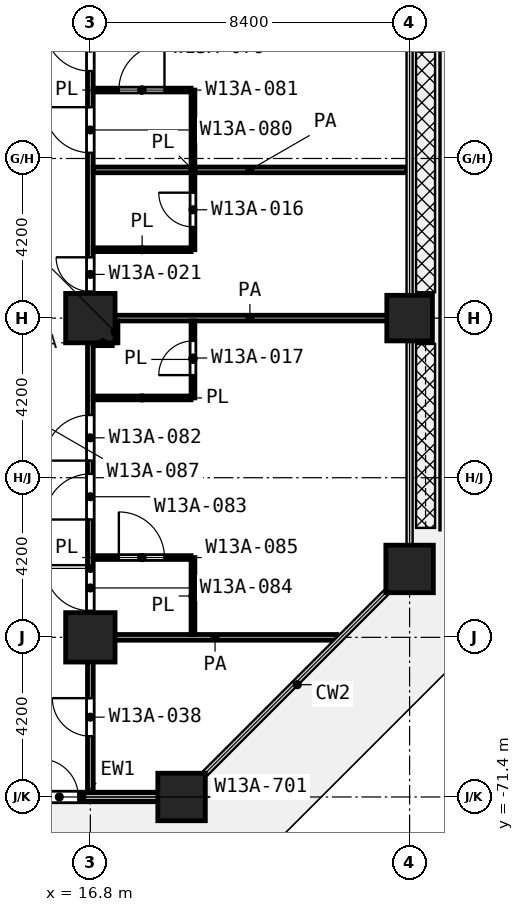
"""IFC4 building model, lengths in metres.
Left out: names, types, materials, properties, quantities, classifications, styles, units other than length and angle.
Written with IfcOpenShell. Run it as: python <this file> out.ifc"""

import sys

from ifc_helpers import new_model, si_unit, direction, frame, frame_2d, origin, origin_2d, place, context, subcontext, project, spatial, rectangle, extrude, element, fill, save


model = new_model("IFC4")
c1 = context("Model", 3, precision=1e-05, world=origin(), true_north=direction((0.0, 1.0)))
c2 = subcontext(c1, "Body", "Model", "MODEL_VIEW")
j1 = project(units=[si_unit("LENGTHUNIT", "METRE"), si_unit("PLANEANGLEUNIT", "RADIAN")], contexts=[c1])
p1 = place(None, origin())
s1 = spatial("IfcSite", under=j1, at=p1, CompositionType="ELEMENT")
p2 = place(p1, origin())
s2 = spatial("IfcBuilding", under=s1, at=p2, CompositionType="ELEMENT")
p3 = place(p2, frame((0.0, 0.0, 60.2)))
s3 = spatial("IfcBuildingStorey", under=s2, at=p3, CompositionType="ELEMENT", Elevation=60.2)
p4 = place(p3, frame((16.8, -58.8, 0.0), z_axis=(0.0, 0.0, 1.0), x_axis=(1.0, 0.0, 0.0)))
e1 = element("IfcColumn", 1, at=p4, inside=s3, PredefinedType="COLUMN", context=c2, shape_type="SweptSolid", body=[
    extrude(rectangle(XDim=1.3, YDim=1.3, at=origin_2d()), origin(), (0.0, 0.0, 1.0), 4.2),
])
p5 = place(p3, frame((25.2, -58.8, 0.0), z_axis=(0.0, 0.0, 1.0), x_axis=(1.0, 0.0, 0.0)))
e2 = element("IfcColumn", 2, at=p5, inside=s3, PredefinedType="COLUMN", context=c2, shape_type="SweptSolid", body=[
    extrude(rectangle(XDim=1.2, YDim=1.2, at=origin_2d()), origin(), (0.0, 0.0, 1.0), 4.2),
])
p6 = place(p3, frame((25.2, -65.4, 0.0), z_axis=(0.0, 0.0, 1.0), x_axis=(1.0, 0.0, 0.0)))
e3 = element("IfcColumn", 3, at=p6, inside=s3, PredefinedType="COLUMN", context=c2, shape_type="SweptSolid", body=[
    extrude(rectangle(XDim=1.25, YDim=1.25, at=origin_2d()), origin(), (0.0, 0.0, 1.0), 4.2),
])
p7 = place(p3, frame((16.8, -67.2, 0.0), z_axis=(0.0, 0.0, 1.0), x_axis=(1.0, 0.0, 0.0)))
e4 = element("IfcColumn", 4, at=p7, inside=s3, PredefinedType="COLUMN", context=c2, shape_type="SweptSolid", body=[
    extrude(rectangle(XDim=1.3, YDim=1.3, at=origin_2d()), origin(), (0.0, 0.0, 1.0), 4.2),
])
p8 = place(p3, frame((19.2, -71.4, 0.0), z_axis=(0.0, 0.0, 1.0), x_axis=(1.0, 0.0, 0.0)))
e5 = element("IfcColumn", 5, at=p8, inside=s3, PredefinedType="COLUMN", context=c2, shape_type="SweptSolid", body=[
    extrude(rectangle(XDim=1.25, YDim=1.25, at=origin_2d()), origin(), (0.0, 0.0, 1.0), 4.2),
])
p9 = place(p3, frame((14.592, -71.4, 0.0), z_axis=(0.0, 0.0, 1.0), x_axis=(1.0, 0.0, 0.0)))
e6 = element("IfcWall", 6, at=p9, inside=s3, PredefinedType="SOLIDWALL", context=c2, shape_type="SweptSolid", body=[
    extrude(rectangle(XDim=3.983, YDim=0.25, at=frame_2d((1.992, 0.0))), origin(), (0.0, 0.0, 1.0), 3.78),
])
p10 = place(p9, frame((0.892, 0.0, 0.0)))
e7 = element("IfcOpeningElement", 7, at=p10, cuts=e6, PredefinedType="OPENING", context=c2, shape_type="SweptSolid", body=[
    extrude(rectangle(XDim=1.0, YDim=2.1, at=frame_2d((0.5, 1.05))), frame((0.0, 0.135, 0.0), z_axis=(0.0, -1.0, 0.0), x_axis=(1.0, 0.0, 0.0)), (0.0, 0.0, 1.0), 0.27),
])
p11 = place(p3, frame((16.875, -65.1, 0.0), z_axis=(0.0, 0.0, 1.0), x_axis=(1.0, 0.0, 0.0)))
e8 = element("IfcWall", 8, at=p11, inside=s3, PredefinedType="PARTITIONING", context=c2, shape_type="SweptSolid", body=[
    extrude(rectangle(XDim=2.575, YDim=0.1, at=frame_2d((1.288, 0.0))), origin(), (0.0, 0.0, 1.0), 3.9),
])
p12 = place(p11, frame((0.675, 0.0, 0.0)))
e9 = element("IfcOpeningElement", 9, at=p12, cuts=e8, PredefinedType="OPENING", context=c2, shape_type="SweptSolid", body=[
    extrude(rectangle(XDim=1.2, YDim=2.1, at=frame_2d((0.6, 1.05))), frame((0.0, 0.06, 0.0), z_axis=(0.0, -1.0, 0.0), x_axis=(1.0, 0.0, 0.0)), (0.0, 0.0, 1.0), 0.12),
])
for number, where, z_axis, x_axis in (
    (10, (16.875, -60.9, 0.0), (0.0, 0.0, 1.0), (1.0, 0.0, 0.0)),
    (11, (16.875, -57.0, 0.0), (0.0, 0.0, 1.0), (1.0, 0.0, 0.0)),
):
    element("IfcWall", number, at=place(p3, frame(where, z_axis=z_axis, x_axis=x_axis)), inside=s3, PredefinedType="PARTITIONING", context=c2, shape_type="SweptSolid", body=[
        extrude(rectangle(XDim=2.575, YDim=0.1, at=frame_2d((1.288, 0.0))), origin(), (0.0, 0.0, 1.0), 3.9),
    ])
p13 = place(p3, frame((16.875, -52.8, 0.0), z_axis=(0.0, 0.0, 1.0), x_axis=(1.0, 0.0, 0.0)))
e12 = element("IfcWall", 12, at=p13, inside=s3, PredefinedType="PARTITIONING", context=c2, shape_type="SweptSolid", body=[
    extrude(rectangle(XDim=2.575, YDim=0.1, at=frame_2d((1.288, 0.0))), origin(), (0.0, 0.0, 1.0), 3.9),
])
p14 = place(p13, frame((0.675, 0.0, 0.0)))
e13 = element("IfcOpeningElement", 13, at=p14, cuts=e12, PredefinedType="OPENING", context=c2, shape_type="SweptSolid", body=[
    extrude(rectangle(XDim=1.2, YDim=2.1, at=frame_2d((0.6, 1.05))), frame((0.0, 0.06, 0.0), z_axis=(0.0, -1.0, 0.0), x_axis=(1.0, 0.0, 0.0)), (0.0, 0.0, 1.0), 0.12),
])
p15 = place(p3, frame((19.5, -67.125, 0.0), z_axis=(0.0, 0.0, 1.0), x_axis=(0.0, 1.0, 0.0)))
e14 = element("IfcWall", 14, at=p15, inside=s3, PredefinedType="PARTITIONING", context=c2, shape_type="SweptSolid", body=[
    extrude(rectangle(XDim=2.025, YDim=0.1, at=frame_2d((1.012, 0.0))), origin(), (0.0, 0.0, 1.0), 3.9),
])
p16 = place(p3, frame((19.5, -60.9, 0.0), z_axis=(0.0, 0.0, 1.0), x_axis=(0.0, 1.0, 0.0)))
e15 = element("IfcWall", 15, at=p16, inside=s3, PredefinedType="PARTITIONING", context=c2, shape_type="SweptSolid", body=[
    extrude(rectangle(XDim=2.025, YDim=0.1, at=frame_2d((1.012, 0.0))), origin(), (0.0, 0.0, 1.0), 3.9),
])
p17 = place(p16, frame((0.6, 0.0, 0.0)))
e16 = element("IfcOpeningElement", 16, at=p17, cuts=e15, PredefinedType="OPENING", context=c2, shape_type="SweptSolid", body=[
    extrude(rectangle(XDim=0.9, YDim=2.1, at=frame_2d((0.45, 1.05))), frame((0.0, 0.06, 0.0), z_axis=(0.0, -1.0, 0.0), x_axis=(1.0, 0.0, 0.0)), (0.0, 0.0, 1.0), 0.12),
])
p18 = place(p3, frame((19.5, -57.0, 0.0), z_axis=(0.0, 0.0, 1.0), x_axis=(0.0, 1.0, 0.0)))
e17 = element("IfcWall", 17, at=p18, inside=s3, PredefinedType="PARTITIONING", context=c2, shape_type="SweptSolid", body=[
    extrude(rectangle(XDim=4.2, YDim=0.1, at=frame_2d((2.1, 0.0))), origin(), (0.0, 0.0, 1.0), 3.9),
])
p19 = place(p18, frame((0.6, 0.0, 0.0)))
e18 = element("IfcOpeningElement", 18, at=p19, cuts=e17, PredefinedType="OPENING", context=c2, shape_type="SweptSolid", body=[
    extrude(rectangle(XDim=0.9, YDim=2.1, at=frame_2d((0.45, 1.05))), frame((0.0, 0.06, 0.0), z_axis=(0.0, -1.0, 0.0), x_axis=(1.0, 0.0, 0.0)), (0.0, 0.0, 1.0), 0.12),
])
p20 = place(p3, frame((16.875, -67.2, 0.0), z_axis=(0.0, 0.0, 1.0), x_axis=(1.0, 0.0, 0.0)))
e19 = element("IfcWall", 19, at=p20, inside=s3, PredefinedType="PARTITIONING", context=c2, shape_type="SweptSolid", body=[
    extrude(rectangle(XDim=6.412, YDim=0.15, at=frame_2d((3.206, 0.0))), origin(), (0.0, 0.0, 1.0), 3.9),
])
p21 = place(p3, frame((16.877, -59.45, 0.0), z_axis=(0.0, 0.0, 1.0), x_axis=(1.0, 0.0, 0.0)))
e20 = element("IfcWall", 20, at=p21, inside=s3, PredefinedType="PARTITIONING", context=c2, shape_type="SweptSolid", body=[
    extrude(rectangle(XDim=0.498, YDim=0.15, at=frame_2d((0.249, 0.0))), origin(), (0.0, 0.0, 1.0), 3.9),
])
p22 = place(p3, frame((16.877, -58.8, 0.0), z_axis=(0.0, 0.0, 1.0), x_axis=(1.0, 0.0, 0.0)))
e21 = element("IfcWall", 21, at=p22, inside=s3, PredefinedType="PARTITIONING", context=c2, shape_type="SweptSolid", body=[
    extrude(rectangle(XDim=8.243, YDim=0.15, at=frame_2d((4.122, 0.0))), origin(), (0.0, 0.0, 1.0), 3.9),
])
p23 = place(p3, frame((16.875, -54.9, 0.0), z_axis=(0.0, 0.0, 1.0), x_axis=(1.0, 0.0, 0.0)))
e22 = element("IfcWall", 22, at=p23, inside=s3, PredefinedType="PARTITIONING", context=c2, shape_type="SweptSolid", body=[
    extrude(rectangle(XDim=8.245, YDim=0.15, at=frame_2d((4.123, 0.0))), origin(), (0.0, 0.0, 1.0), 3.9),
])
p24 = place(p3, frame((16.8, -71.32, 0.0), z_axis=(0.0, 0.0, 1.0), x_axis=(0.0, 1.0, 0.0)))
e23 = element("IfcWall", 23, at=p24, inside=s3, PredefinedType="PARTITIONING", context=c2, shape_type="SweptSolid", body=[
    extrude(rectangle(XDim=11.868, YDim=0.15, at=frame_2d((5.934, 0.0))), origin(), (0.0, 0.0, 1.0), 3.9),
])
p25 = place(p24, frame((8.77, 0.0, 0.0)))
e24 = element("IfcOpeningElement", 24, at=p25, cuts=e23, PredefinedType="OPENING", context=c2, shape_type="SweptSolid", body=[
    extrude(rectangle(XDim=1.2, YDim=2.1, at=frame_2d((0.6, 1.05))), frame((0.0, 0.085, 0.0), z_axis=(0.0, -1.0, 0.0), x_axis=(1.0, 0.0, 0.0)), (0.0, 0.0, 1.0), 0.17),
])
p26 = place(p24, frame((7.22, 0.0, 0.0)))
e25 = element("IfcOpeningElement", 25, at=p26, cuts=e23, PredefinedType="OPENING", context=c2, shape_type="SweptSolid", body=[
    extrude(rectangle(XDim=1.2, YDim=2.1, at=frame_2d((0.6, 1.05))), frame((0.0, 0.085, 0.0), z_axis=(0.0, -1.0, 0.0), x_axis=(1.0, 0.0, 0.0)), (0.0, 0.0, 1.0), 0.17),
])
p27 = place(p24, frame((4.82, 0.0, 0.0)))
e26 = element("IfcOpeningElement", 26, at=p27, cuts=e23, PredefinedType="OPENING", context=c2, shape_type="SweptSolid", body=[
    extrude(rectangle(XDim=1.2, YDim=2.1, at=frame_2d((0.6, 1.05))), frame((0.0, 0.085, 0.0), z_axis=(0.0, -1.0, 0.0), x_axis=(1.0, 0.0, 0.0)), (0.0, 0.0, 1.0), 0.17),
])
p28 = place(p24, frame((1.52, 0.0, 0.0)))
e27 = element("IfcOpeningElement", 27, at=p28, cuts=e23, PredefinedType="OPENING", context=c2, shape_type="SweptSolid", body=[
    extrude(rectangle(XDim=1.0, YDim=2.1, at=frame_2d((0.5, 1.05))), frame((0.0, 0.085, 0.0), z_axis=(0.0, -1.0, 0.0), x_axis=(1.0, 0.0, 0.0)), (0.0, 0.0, 1.0), 0.17),
])
p29 = place(p3, frame((16.8, -58.798, 0.0), z_axis=(0.0, 0.0, 1.0), x_axis=(0.0, 1.0, 0.0)))
e28 = element("IfcWall", 28, at=p29, inside=s3, PredefinedType="PARTITIONING", context=c2, shape_type="SweptSolid", body=[
    extrude(rectangle(XDim=33.698, YDim=0.15, at=frame_2d((16.849, 0.0))), origin(), (0.0, 0.0, 1.0), 3.9),
])
p30 = place(p29, frame((23.298, 0.0, 0.0)))
e29 = element("IfcOpeningElement", 29, at=p30, cuts=e28, PredefinedType="OPENING", context=c2, shape_type="SweptSolid", body=[
    extrude(rectangle(XDim=1.2, YDim=2.1, at=frame_2d((0.6, 1.05))), frame((0.0, 0.085, 0.0), z_axis=(0.0, -1.0, 0.0), x_axis=(1.0, 0.0, 0.0)), (0.0, 0.0, 1.0), 0.17),
])
p31 = place(p29, frame((15.223, 0.0, 0.0)))
e30 = element("IfcOpeningElement", 30, at=p31, cuts=e28, PredefinedType="OPENING", context=c2, shape_type="SweptSolid", body=[
    extrude(rectangle(XDim=0.9, YDim=2.1, at=frame_2d((0.45, 1.05))), frame((0.0, 0.085, 0.0), z_axis=(0.0, -1.0, 0.0), x_axis=(1.0, 0.0, 0.0)), (0.0, 0.0, 1.0), 0.17),
])
p32 = place(p29, frame((13.348, 0.0, 0.0)))
e31 = element("IfcOpeningElement", 31, at=p32, cuts=e28, PredefinedType="OPENING", context=c2, shape_type="SweptSolid", body=[
    extrude(rectangle(XDim=1.2, YDim=2.1, at=frame_2d((0.6, 1.05))), frame((0.0, 0.085, 0.0), z_axis=(0.0, -1.0, 0.0), x_axis=(1.0, 0.0, 0.0)), (0.0, 0.0, 1.0), 0.17),
])
p33 = place(p29, frame((9.098, 0.0, 0.0)))
e32 = element("IfcOpeningElement", 32, at=p33, cuts=e28, PredefinedType="OPENING", context=c2, shape_type="SweptSolid", body=[
    extrude(rectangle(XDim=1.2, YDim=2.1, at=frame_2d((0.6, 1.05))), frame((0.0, 0.085, 0.0), z_axis=(0.0, -1.0, 0.0), x_axis=(1.0, 0.0, 0.0)), (0.0, 0.0, 1.0), 0.17),
])
p34 = place(p29, frame((6.498, 0.0, 0.0)))
e33 = element("IfcOpeningElement", 33, at=p34, cuts=e28, PredefinedType="OPENING", context=c2, shape_type="SweptSolid", body=[
    extrude(rectangle(XDim=1.2, YDim=2.1, at=frame_2d((0.6, 1.05))), frame((0.0, 0.085, 0.0), z_axis=(0.0, -1.0, 0.0), x_axis=(1.0, 0.0, 0.0)), (0.0, 0.0, 1.0), 0.17),
])
p35 = place(p29, frame((4.348, 0.0, 0.0)))
e34 = element("IfcOpeningElement", 34, at=p35, cuts=e28, PredefinedType="OPENING", context=c2, shape_type="SweptSolid", body=[
    extrude(rectangle(XDim=1.2, YDim=2.1, at=frame_2d((0.6, 1.05))), frame((0.0, 0.085, 0.0), z_axis=(0.0, -1.0, 0.0), x_axis=(1.0, 0.0, 0.0)), (0.0, 0.0, 1.0), 0.17),
])
p36 = place(p29, frame((0.698, 0.0, 0.0)))
e35 = element("IfcOpeningElement", 35, at=p36, cuts=e28, PredefinedType="OPENING", context=c2, shape_type="SweptSolid", body=[
    extrude(rectangle(XDim=0.9, YDim=2.1, at=frame_2d((0.45, 1.05))), frame((0.0, 0.085, 0.0), z_axis=(0.0, -1.0, 0.0), x_axis=(1.0, 0.0, 0.0)), (0.0, 0.0, 1.0), 0.17),
])
p37 = place(p3, frame((17.45, -59.45, 0.0), z_axis=(0.0, 0.0, 1.0), x_axis=(0.0, 1.0, 0.0)))
e36 = element("IfcWall", 36, at=p37, inside=s3, PredefinedType="PARTITIONING", context=c2, shape_type="SweptSolid", body=[
    extrude(rectangle(XDim=0.575, YDim=0.15, at=frame_2d((0.288, 0.0))), origin(), (0.0, 0.0, 1.0), 3.9),
])
p38 = place(p10, origin())
e37 = element("IfcDoor", 37, at=p38, inside=s3, OperationType="SINGLE_SWING_LEFT", PredefinedType="DOOR", context=c2, shape_type="SweptSolid", body=[
    extrude(rectangle(XDim=1.0, YDim=2.1, at=frame_2d((0.5, 1.05))), frame((0.0, 0.025, 0.0), z_axis=(0.0, -1.0, 0.0), x_axis=(1.0, 0.0, 0.0)), (0.0, 0.0, 1.0), 0.05),
])
fill(e7, e37)
p39 = place(p34, origin())
e38 = element("IfcDoor", 38, at=p39, inside=s3, OperationType="SINGLE_SWING_RIGHT", PredefinedType="DOOR", context=c2, shape_type="SweptSolid", body=[
    extrude(rectangle(XDim=1.2, YDim=2.1, at=frame_2d((0.6, 1.05))), frame((0.0, 0.025, 0.0), z_axis=(0.0, -1.0, 0.0), x_axis=(1.0, 0.0, 0.0)), (0.0, 0.0, 1.0), 0.05),
])
fill(e33, e38)
p40 = place(p35, origin())
e39 = element("IfcDoor", 39, at=p40, inside=s3, OperationType="SINGLE_SWING_RIGHT", PredefinedType="DOOR", context=c2, shape_type="SweptSolid", body=[
    extrude(rectangle(XDim=1.2, YDim=2.1, at=frame_2d((0.6, 1.05))), frame((0.0, 0.025, 0.0), z_axis=(0.0, -1.0, 0.0), x_axis=(1.0, 0.0, 0.0)), (0.0, 0.0, 1.0), 0.05),
])
fill(e34, e39)
p41 = place(p14, origin())
e40 = element("IfcDoor", 40, at=p41, inside=s3, OperationType="SINGLE_SWING_RIGHT", PredefinedType="DOOR", context=c2, shape_type="SweptSolid", body=[
    extrude(rectangle(XDim=1.2, YDim=2.1, at=frame_2d((0.6, 1.05))), frame((0.0, 0.025, 0.0), z_axis=(0.0, -1.0, 0.0), x_axis=(1.0, 0.0, 0.0)), (0.0, 0.0, 1.0), 0.05),
])
fill(e13, e40)
p42 = place(p36, origin())
e41 = element("IfcDoor", 41, at=p42, inside=s3, OperationType="SINGLE_SWING_RIGHT", PredefinedType="DOOR", context=c2, shape_type="SweptSolid", body=[
    extrude(rectangle(XDim=0.9, YDim=2.1, at=frame_2d((0.45, 1.05))), frame((0.0, 0.025, 0.0), z_axis=(0.0, -1.0, 0.0), x_axis=(1.0, 0.0, 0.0)), (0.0, 0.0, 1.0), 0.05),
])
fill(e35, e41)
p43 = place(p19, origin())
e42 = element("IfcDoor", 42, at=p43, inside=s3, OperationType="SINGLE_SWING_RIGHT", PredefinedType="DOOR", context=c2, shape_type="SweptSolid", body=[
    extrude(rectangle(XDim=0.9, YDim=2.1, at=frame_2d((0.45, 1.05))), frame((0.0, 0.025, 0.0), z_axis=(0.0, -1.0, 0.0), x_axis=(1.0, 0.0, 0.0)), (0.0, 0.0, 1.0), 0.05),
])
fill(e18, e42)
p44 = place(p25, origin())
e43 = element("IfcDoor", 43, at=p44, inside=s3, OperationType="SINGLE_SWING_LEFT", PredefinedType="DOOR", context=c2, shape_type="SweptSolid", body=[
    extrude(rectangle(XDim=1.2, YDim=2.1, at=frame_2d((0.6, 1.05))), frame((0.0, 0.025, 0.0), z_axis=(0.0, -1.0, 0.0), x_axis=(1.0, 0.0, 0.0)), (0.0, 0.0, 1.0), 0.05),
])
fill(e24, e43)
p45 = place(p26, origin())
e44 = element("IfcDoor", 44, at=p45, inside=s3, OperationType="SINGLE_SWING_LEFT", PredefinedType="DOOR", context=c2, shape_type="SweptSolid", body=[
    extrude(rectangle(XDim=1.2, YDim=2.1, at=frame_2d((0.6, 1.05))), frame((0.0, 0.025, 0.0), z_axis=(0.0, -1.0, 0.0), x_axis=(1.0, 0.0, 0.0)), (0.0, 0.0, 1.0), 0.05),
])
fill(e25, e44)
p46 = place(p27, origin())
e45 = element("IfcDoor", 45, at=p46, inside=s3, OperationType="SINGLE_SWING_RIGHT", PredefinedType="DOOR", context=c2, shape_type="SweptSolid", body=[
    extrude(rectangle(XDim=1.2, YDim=2.1, at=frame_2d((0.6, 1.05))), frame((0.0, 0.025, 0.0), z_axis=(0.0, -1.0, 0.0), x_axis=(1.0, 0.0, 0.0)), (0.0, 0.0, 1.0), 0.05),
])
fill(e26, e45)
p47 = place(p12, origin())
e46 = element("IfcDoor", 46, at=p47, inside=s3, OperationType="SINGLE_SWING_LEFT", PredefinedType="DOOR", context=c2, shape_type="SweptSolid", body=[
    extrude(rectangle(XDim=1.2, YDim=2.1, at=frame_2d((0.6, 1.05))), frame((0.0, 0.025, 0.0), z_axis=(0.0, -1.0, 0.0), x_axis=(1.0, 0.0, 0.0)), (0.0, 0.0, 1.0), 0.05),
])
fill(e9, e46)
p48 = place(p17, origin())
e47 = element("IfcDoor", 47, at=p48, inside=s3, OperationType="SINGLE_SWING_LEFT", PredefinedType="DOOR", context=c2, shape_type="SweptSolid", body=[
    extrude(rectangle(XDim=0.9, YDim=2.1, at=frame_2d((0.45, 1.05))), frame((0.0, 0.025, 0.0), z_axis=(0.0, -1.0, 0.0), x_axis=(1.0, 0.0, 0.0)), (0.0, 0.0, 1.0), 0.05),
])
fill(e16, e47)
p49 = place(p28, origin())
e48 = element("IfcDoor", 48, at=p49, inside=s3, OperationType="SINGLE_SWING_RIGHT", PredefinedType="DOOR", context=c2, shape_type="SweptSolid", body=[
    extrude(rectangle(XDim=1.0, YDim=2.1, at=frame_2d((0.5, 1.05))), frame((0.0, 0.025, 0.0), z_axis=(0.0, -1.0, 0.0), x_axis=(1.0, 0.0, 0.0)), (0.0, 0.0, 1.0), 0.05),
])
fill(e27, e48)
save(model, sys.argv[1])
